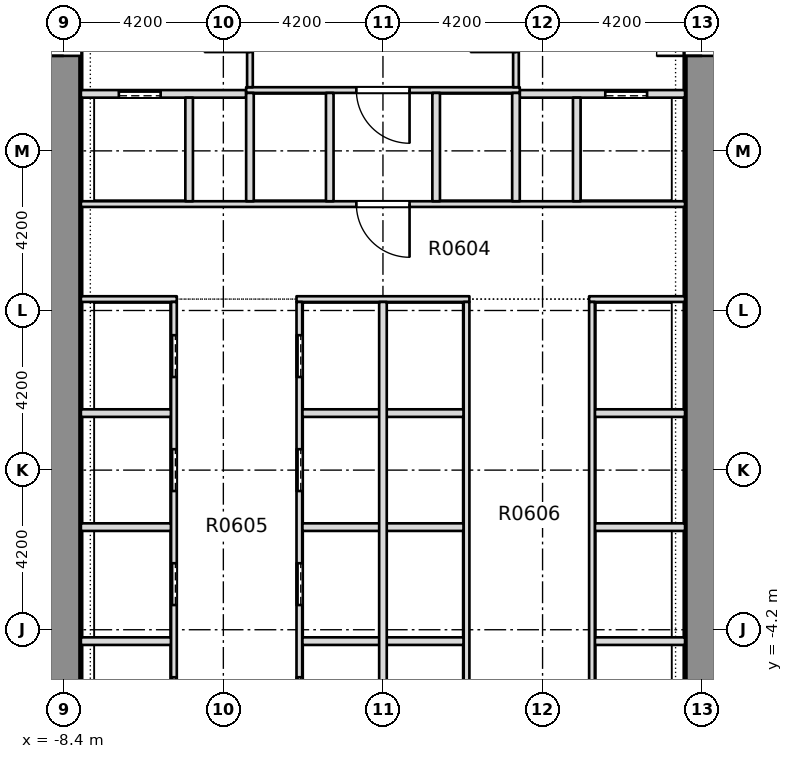
"""IFC4 building model, lengths in metres.
Left out: names, types, materials, properties, quantities, classifications, styles, units other than length and angle.
Written with IfcOpenShell. Run it as: python <this file> out.ifc"""

import sys

from ifc_helpers import new_model, si_unit, direction, frame, frame_2d, origin, place, context, subcontext, project, spatial, rectangle, extrude, element, fill, save


model = new_model("IFC4")
c1 = context("Model", 3, precision=1e-05, world=origin(), true_north=direction((0.0, 1.0)))
c2 = subcontext(c1, "Body", "Model", "MODEL_VIEW")
j1 = project(units=[si_unit("LENGTHUNIT", "METRE"), si_unit("PLANEANGLEUNIT", "RADIAN")], contexts=[c1])
p1 = place(None, origin())
s1 = spatial("IfcSite", under=j1, at=p1, CompositionType="ELEMENT")
p2 = place(p1, origin())
s2 = spatial("IfcBuilding", under=s1, at=p2, CompositionType="ELEMENT")
p3 = place(p2, frame((0.0, 0.0, 34.5)))
s3 = spatial("IfcBuildingStorey", under=s2, at=p3, CompositionType="ELEMENT", Elevation=34.5)
p4 = place(p3, frame((-8.4, -7.5, -0.32), z_axis=(0.0, 0.0, 1.0), x_axis=(0.0, 1.0, 0.0)))
e1 = element("IfcWall", 1, at=p4, inside=s3, PredefinedType="SHEAR", context=c2, shape_type="SweptSolid", body=[
    extrude(rectangle(XDim=28.35, YDim=0.9, at=frame_2d((14.175, 0.0))), origin(), (0.0, 0.0, 1.0), 3.45),
])
p5 = place(p4, frame((18.4, 0.0, 0.32)))
e2 = element("IfcOpeningElement", 2, at=p5, cuts=e1, PredefinedType="OPENING", context=c2, shape_type="SweptSolid", body=[
    extrude(rectangle(XDim=1.2, YDim=2.1, at=frame_2d((0.6, 1.05))), frame((0.0, 0.46, 0.0), z_axis=(0.0, -1.0, 0.0), x_axis=(1.0, 0.0, 0.0)), (0.0, 0.0, 1.0), 0.92),
])
p6 = place(p3, frame((8.4, -7.5, -0.32), z_axis=(0.0, 0.0, 1.0), x_axis=(0.0, 1.0, 0.0)))
e3 = element("IfcWall", 3, at=p6, inside=s3, PredefinedType="SHEAR", context=c2, shape_type="SweptSolid", body=[
    extrude(rectangle(XDim=28.35, YDim=0.9, at=frame_2d((14.175, 0.0))), origin(), (0.0, 0.0, 1.0), 3.45),
])
p7 = place(p6, frame((18.4, 0.0, 0.32)))
e4 = element("IfcOpeningElement", 4, at=p7, cuts=e3, PredefinedType="OPENING", context=c2, shape_type="SweptSolid", body=[
    extrude(rectangle(XDim=1.2, YDim=2.1, at=frame_2d((0.6, 1.05))), frame((0.0, 0.46, 0.0), z_axis=(0.0, -1.0, 0.0), x_axis=(1.0, 0.0, 0.0)), (0.0, 0.0, 1.0), 0.92),
])
p8 = place(p3, frame((-7.949, -4.5, 0.0), z_axis=(0.0, 0.0, 1.0), x_axis=(1.0, 0.0, 0.0)))
e5 = element("IfcWall", 5, at=p8, inside=s3, PredefinedType="PARTITIONING", context=c2, shape_type="SweptSolid", body=[
    extrude(rectangle(XDim=2.374, YDim=0.2, at=frame_2d((1.187, 0.0))), origin(), (0.0, 0.0, 1.0), 3.13),
])
p9 = place(p3, frame((-2.125, -4.5, 0.0), z_axis=(0.0, 0.0, 1.0), x_axis=(1.0, 0.0, 0.0)))
e6 = element("IfcWall", 6, at=p9, inside=s3, PredefinedType="PARTITIONING", context=c2, shape_type="SweptSolid", body=[
    extrude(rectangle(XDim=4.25, YDim=0.2, at=frame_2d((2.125, 0.0))), origin(), (0.0, 0.0, 1.0), 3.13),
])
for number, where, z_axis, x_axis in (
    (7, (5.575, -4.5, 0.0), (0.0, 0.0, 1.0), (1.0, 0.0, 0.0)),
    (8, (-7.949, -1.5, 0.0), (0.0, 0.0, 1.0), (1.0, 0.0, 0.0)),
):
    element("IfcWall", number, at=place(p3, frame(where, z_axis=z_axis, x_axis=x_axis)), inside=s3, PredefinedType="PARTITIONING", context=c2, shape_type="SweptSolid", body=[
        extrude(rectangle(XDim=2.374, YDim=0.2, at=frame_2d((1.187, 0.0))), origin(), (0.0, 0.0, 1.0), 3.13),
    ])
p10 = place(p3, frame((-2.125, -1.5, 0.0), z_axis=(0.0, 0.0, 1.0), x_axis=(1.0, 0.0, 0.0)))
e9 = element("IfcWall", 9, at=p10, inside=s3, PredefinedType="PARTITIONING", context=c2, shape_type="SweptSolid", body=[
    extrude(rectangle(XDim=4.25, YDim=0.2, at=frame_2d((2.125, 0.0))), origin(), (0.0, 0.0, 1.0), 3.13),
])
for number, where, z_axis, x_axis in (
    (10, (5.575, -1.5, 0.0), (0.0, 0.0, 1.0), (1.0, 0.0, 0.0)),
    (11, (-7.949, 1.5, 0.0), (0.0, 0.0, 1.0), (1.0, 0.0, 0.0)),
):
    element("IfcWall", number, at=place(p3, frame(where, z_axis=z_axis, x_axis=x_axis)), inside=s3, PredefinedType="PARTITIONING", context=c2, shape_type="SweptSolid", body=[
        extrude(rectangle(XDim=2.374, YDim=0.2, at=frame_2d((1.187, 0.0))), origin(), (0.0, 0.0, 1.0), 3.13),
    ])
p11 = place(p3, frame((-2.125, 1.5, 0.0), z_axis=(0.0, 0.0, 1.0), x_axis=(1.0, 0.0, 0.0)))
e12 = element("IfcWall", 12, at=p11, inside=s3, PredefinedType="PARTITIONING", context=c2, shape_type="SweptSolid", body=[
    extrude(rectangle(XDim=4.25, YDim=0.2, at=frame_2d((2.125, 0.0))), origin(), (0.0, 0.0, 1.0), 3.13),
])
p12 = place(p3, frame((5.575, 1.5, 0.0), z_axis=(0.0, 0.0, 1.0), x_axis=(1.0, 0.0, 0.0)))
e13 = element("IfcWall", 13, at=p12, inside=s3, PredefinedType="PARTITIONING", context=c2, shape_type="SweptSolid", body=[
    extrude(rectangle(XDim=2.374, YDim=0.2, at=frame_2d((1.187, 0.0))), origin(), (0.0, 0.0, 1.0), 3.13),
])
p13 = place(p3, frame((-7.949, 4.5, 0.0), z_axis=(0.0, 0.0, 1.0), x_axis=(1.0, 0.0, 0.0)))
e14 = element("IfcWall", 14, at=p13, inside=s3, PredefinedType="PARTITIONING", context=c2, shape_type="SweptSolid", body=[
    extrude(rectangle(XDim=2.524, YDim=0.15, at=frame_2d((1.262, 0.0))), origin(), (0.0, 0.0, 1.0), 3.13),
])
p14 = place(p3, frame((-2.275, 4.5, 0.0), z_axis=(0.0, 0.0, 1.0), x_axis=(1.0, 0.0, 0.0)))
e15 = element("IfcWall", 15, at=p14, inside=s3, PredefinedType="PARTITIONING", context=c2, shape_type="SweptSolid", body=[
    extrude(rectangle(XDim=4.55, YDim=0.15, at=frame_2d((2.275, 0.0))), origin(), (0.0, 0.0, 1.0), 3.13),
])
p15 = place(p3, frame((5.425, 4.5, 0.0), z_axis=(0.0, 0.0, 1.0), x_axis=(1.0, 0.0, 0.0)))
e16 = element("IfcWall", 16, at=p15, inside=s3, PredefinedType="PARTITIONING", context=c2, shape_type="SweptSolid", body=[
    extrude(rectangle(XDim=2.524, YDim=0.15, at=frame_2d((1.262, 0.0))), origin(), (0.0, 0.0, 1.0), 3.13),
])
p16 = place(p3, frame((-7.949, 7.0, 0.0), z_axis=(0.0, 0.0, 1.0), x_axis=(1.0, 0.0, 0.0)))
e17 = element("IfcWall", 17, at=p16, inside=s3, PredefinedType="PARTITIONING", context=c2, shape_type="SweptSolid", body=[
    extrude(rectangle(XDim=15.898, YDim=0.15, at=frame_2d((7.949, 0.0))), origin(), (0.0, 0.0, 1.0), 3.13),
])
p17 = place(p16, frame((7.249, 0.0, 0.0)))
e18 = element("IfcOpeningElement", 18, at=p17, cuts=e17, PredefinedType="OPENING", context=c2, shape_type="SweptSolid", body=[
    extrude(rectangle(XDim=1.4, YDim=2.1, at=frame_2d((0.7, 1.05))), frame((0.0, 0.085, 0.0), z_axis=(0.0, -1.0, 0.0), x_axis=(1.0, 0.0, 0.0)), (0.0, 0.0, 1.0), 0.17),
])
p18 = place(p3, frame((-7.949, 9.9, 0.0), z_axis=(0.0, 0.0, 1.0), x_axis=(1.0, 0.0, 0.0)))
e19 = element("IfcWall", 19, at=p18, inside=s3, PredefinedType="PARTITIONING", context=c2, shape_type="SweptSolid", body=[
    extrude(rectangle(XDim=4.349, YDim=0.2, at=frame_2d((2.174, 0.0))), origin(), (0.0, 0.0, 1.0), 3.13),
])
p19 = place(p18, frame((0.999, 0.0, 0.0)))
e20 = element("IfcOpeningElement", 20, at=p19, cuts=e19, PredefinedType="OPENING", context=c2, shape_type="SweptSolid", body=[
    extrude(rectangle(XDim=1.1, YDim=2.1, at=frame_2d((0.55, 1.05))), frame((0.0, 0.11, 0.0), z_axis=(0.0, -1.0, 0.0), x_axis=(1.0, 0.0, 0.0)), (0.0, 0.0, 1.0), 0.22),
])
p20 = place(p3, frame((3.6, 9.9, 0.0), z_axis=(0.0, 0.0, 1.0), x_axis=(1.0, 0.0, 0.0)))
e21 = element("IfcWall", 21, at=p20, inside=s3, PredefinedType="PARTITIONING", context=c2, shape_type="SweptSolid", body=[
    extrude(rectangle(XDim=4.349, YDim=0.2, at=frame_2d((2.174, 0.0))), origin(), (0.0, 0.0, 1.0), 3.13),
])
p21 = place(p20, frame((2.25, 0.0, 0.0)))
e22 = element("IfcOpeningElement", 22, at=p21, cuts=e21, PredefinedType="OPENING", context=c2, shape_type="SweptSolid", body=[
    extrude(rectangle(XDim=1.1, YDim=2.1, at=frame_2d((0.55, 1.05))), frame((0.0, 0.11, 0.0), z_axis=(0.0, -1.0, 0.0), x_axis=(1.0, 0.0, 0.0)), (0.0, 0.0, 1.0), 0.22),
])
p22 = place(p3, frame((-3.6, 10.0, 0.0), z_axis=(0.0, 0.0, 1.0), x_axis=(1.0, 0.0, 0.0)))
e23 = element("IfcWall", 23, at=p22, inside=s3, PredefinedType="PARTITIONING", context=c2, shape_type="SweptSolid", body=[
    extrude(rectangle(XDim=7.2, YDim=0.15, at=frame_2d((3.6, 0.0))), origin(), (0.0, 0.0, 1.0), 3.13),
])
p23 = place(p22, frame((2.9, 0.0, 0.0)))
e24 = element("IfcOpeningElement", 24, at=p23, cuts=e23, PredefinedType="OPENING", context=c2, shape_type="SweptSolid", body=[
    extrude(rectangle(XDim=1.4, YDim=2.1, at=frame_2d((0.7, 1.05))), frame((0.0, 0.085, 0.0), z_axis=(0.0, -1.0, 0.0), x_axis=(1.0, 0.0, 0.0)), (0.0, 0.0, 1.0), 0.17),
])
p24 = place(p3, frame((-5.5, -7.499, 0.0), z_axis=(0.0, 0.0, 1.0), x_axis=(0.0, 1.0, 0.0)))
e25 = element("IfcWall", 25, at=p24, inside=s3, PredefinedType="PARTITIONING", context=c2, shape_type="SweptSolid", body=[
    extrude(rectangle(XDim=11.924, YDim=0.15, at=frame_2d((5.962, 0.0))), origin(), (0.0, 0.0, 1.0), 3.13),
])
p25 = place(p24, frame((0.949, 0.0, 0.0)))
e26 = element("IfcOpeningElement", 26, at=p25, cuts=e25, PredefinedType="OPENING", context=c2, shape_type="SweptSolid", body=[
    extrude(rectangle(XDim=1.1, YDim=2.1, at=frame_2d((0.55, 1.05))), frame((0.0, 0.085, 0.0), z_axis=(0.0, -1.0, 0.0), x_axis=(1.0, 0.0, 0.0)), (0.0, 0.0, 1.0), 0.17),
])
p26 = place(p24, frame((3.949, 0.0, 0.0)))
e27 = element("IfcOpeningElement", 27, at=p26, cuts=e25, PredefinedType="OPENING", context=c2, shape_type="SweptSolid", body=[
    extrude(rectangle(XDim=1.1, YDim=2.1, at=frame_2d((0.55, 1.05))), frame((0.0, 0.085, 0.0), z_axis=(0.0, -1.0, 0.0), x_axis=(1.0, 0.0, 0.0)), (0.0, 0.0, 1.0), 0.17),
])
p27 = place(p24, frame((6.949, 0.0, 0.0)))
e28 = element("IfcOpeningElement", 28, at=p27, cuts=e25, PredefinedType="OPENING", context=c2, shape_type="SweptSolid", body=[
    extrude(rectangle(XDim=1.1, YDim=2.1, at=frame_2d((0.55, 1.05))), frame((0.0, 0.085, 0.0), z_axis=(0.0, -1.0, 0.0), x_axis=(1.0, 0.0, 0.0)), (0.0, 0.0, 1.0), 0.17),
])
p28 = place(p24, frame((9.949, 0.0, 0.0)))
e29 = element("IfcOpeningElement", 29, at=p28, cuts=e25, PredefinedType="OPENING", context=c2, shape_type="SweptSolid", body=[
    extrude(rectangle(XDim=1.1, YDim=2.1, at=frame_2d((0.55, 1.05))), frame((0.0, 0.085, 0.0), z_axis=(0.0, -1.0, 0.0), x_axis=(1.0, 0.0, 0.0)), (0.0, 0.0, 1.0), 0.17),
])
p29 = place(p3, frame((-5.1, 7.075, 0.0), z_axis=(0.0, 0.0, 1.0), x_axis=(0.0, 1.0, 0.0)))
e30 = element("IfcWall", 30, at=p29, inside=s3, PredefinedType="PARTITIONING", context=c2, shape_type="SweptSolid", body=[
    extrude(rectangle(XDim=2.725, YDim=0.2, at=frame_2d((1.363, 0.0))), origin(), (0.0, 0.0, 1.0), 3.13),
])
p30 = place(p3, frame((-3.5, 7.075, 0.0), z_axis=(0.0, 0.0, 1.0), x_axis=(0.0, 1.0, 0.0)))
e31 = element("IfcWall", 31, at=p30, inside=s3, PredefinedType="PARTITIONING", context=c2, shape_type="SweptSolid", body=[
    extrude(rectangle(XDim=2.85, YDim=0.2, at=frame_2d((1.425, 0.0))), origin(), (0.0, 0.0, 1.0), 3.13),
])
p31 = place(p3, frame((-3.5, 10.075, 0.0), z_axis=(0.0, 0.0, 1.0), x_axis=(0.0, 1.0, 0.0)))
e32 = element("IfcWall", 32, at=p31, inside=s3, PredefinedType="PARTITIONING", context=c2, shape_type="SweptSolid", body=[
    extrude(rectangle(XDim=3.075, YDim=0.15, at=frame_2d((1.538, 0.0))), origin(), (0.0, 0.0, 1.0), 3.13),
])
p32 = place(p31, frame((0.925, 0.0, 0.0)))
e33 = element("IfcOpeningElement", 33, at=p32, cuts=e32, PredefinedType="OPENING", context=c2, shape_type="SweptSolid", body=[
    extrude(rectangle(XDim=1.2, YDim=2.1, at=frame_2d((0.6, 1.05))), frame((0.0, 0.085, 0.0), z_axis=(0.0, -1.0, 0.0), x_axis=(1.0, 0.0, 0.0)), (0.0, 0.0, 1.0), 0.17),
])
p33 = place(p3, frame((-2.2, -7.499, 0.0), z_axis=(0.0, 0.0, 1.0), x_axis=(0.0, 1.0, 0.0)))
e34 = element("IfcWall", 34, at=p33, inside=s3, PredefinedType="PARTITIONING", context=c2, shape_type="SweptSolid", body=[
    extrude(rectangle(XDim=11.924, YDim=0.15, at=frame_2d((5.962, 0.0))), origin(), (0.0, 0.0, 1.0), 3.13),
])
p34 = place(p33, frame((0.949, 0.0, 0.0)))
e35 = element("IfcOpeningElement", 35, at=p34, cuts=e34, PredefinedType="OPENING", context=c2, shape_type="SweptSolid", body=[
    extrude(rectangle(XDim=1.1, YDim=2.1, at=frame_2d((0.55, 1.05))), frame((0.0, 0.085, 0.0), z_axis=(0.0, -1.0, 0.0), x_axis=(1.0, 0.0, 0.0)), (0.0, 0.0, 1.0), 0.17),
])
p35 = place(p33, frame((3.949, 0.0, 0.0)))
e36 = element("IfcOpeningElement", 36, at=p35, cuts=e34, PredefinedType="OPENING", context=c2, shape_type="SweptSolid", body=[
    extrude(rectangle(XDim=1.1, YDim=2.1, at=frame_2d((0.55, 1.05))), frame((0.0, 0.085, 0.0), z_axis=(0.0, -1.0, 0.0), x_axis=(1.0, 0.0, 0.0)), (0.0, 0.0, 1.0), 0.17),
])
p36 = place(p33, frame((6.949, 0.0, 0.0)))
e37 = element("IfcOpeningElement", 37, at=p36, cuts=e34, PredefinedType="OPENING", context=c2, shape_type="SweptSolid", body=[
    extrude(rectangle(XDim=1.1, YDim=2.1, at=frame_2d((0.55, 1.05))), frame((0.0, 0.085, 0.0), z_axis=(0.0, -1.0, 0.0), x_axis=(1.0, 0.0, 0.0)), (0.0, 0.0, 1.0), 0.17),
])
p37 = place(p33, frame((9.949, 0.0, 0.0)))
e38 = element("IfcOpeningElement", 38, at=p37, cuts=e34, PredefinedType="OPENING", context=c2, shape_type="SweptSolid", body=[
    extrude(rectangle(XDim=1.1, YDim=2.1, at=frame_2d((0.55, 1.05))), frame((0.0, 0.085, 0.0), z_axis=(0.0, -1.0, 0.0), x_axis=(1.0, 0.0, 0.0)), (0.0, 0.0, 1.0), 0.17),
])
p38 = place(p3, frame((-1.4, 7.075, 0.0), z_axis=(0.0, 0.0, 1.0), x_axis=(0.0, 1.0, 0.0)))
e39 = element("IfcWall", 39, at=p38, inside=s3, PredefinedType="PARTITIONING", context=c2, shape_type="SweptSolid", body=[
    extrude(rectangle(XDim=2.85, YDim=0.2, at=frame_2d((1.425, 0.0))), origin(), (0.0, 0.0, 1.0), 3.13),
])
p39 = place(p3, frame((0.0, -7.499, 0.0), z_axis=(0.0, 0.0, 1.0), x_axis=(0.0, 1.0, 0.0)))
e40 = element("IfcWall", 40, at=p39, inside=s3, PredefinedType="PARTITIONING", context=c2, shape_type="SweptSolid", body=[
    extrude(rectangle(XDim=11.924, YDim=0.2, at=frame_2d((5.962, 0.0))), origin(), (0.0, 0.0, 1.0), 3.13),
])
p40 = place(p3, frame((1.4, 7.075, 0.0), z_axis=(0.0, 0.0, 1.0), x_axis=(0.0, 1.0, 0.0)))
e41 = element("IfcWall", 41, at=p40, inside=s3, PredefinedType="PARTITIONING", context=c2, shape_type="SweptSolid", body=[
    extrude(rectangle(XDim=2.85, YDim=0.2, at=frame_2d((1.425, 0.0))), origin(), (0.0, 0.0, 1.0), 3.13),
])
p41 = place(p3, frame((2.2, -7.499, 0.0), z_axis=(0.0, 0.0, 1.0), x_axis=(0.0, 1.0, 0.0)))
e42 = element("IfcWall", 42, at=p41, inside=s3, PredefinedType="PARTITIONING", context=c2, shape_type="SweptSolid", body=[
    extrude(rectangle(XDim=11.924, YDim=0.15, at=frame_2d((5.962, 0.0))), origin(), (0.0, 0.0, 1.0), 3.13),
])
p42 = place(p3, frame((3.5, 7.075, 0.0), z_axis=(0.0, 0.0, 1.0), x_axis=(0.0, 1.0, 0.0)))
e43 = element("IfcWall", 43, at=p42, inside=s3, PredefinedType="PARTITIONING", context=c2, shape_type="SweptSolid", body=[
    extrude(rectangle(XDim=2.85, YDim=0.2, at=frame_2d((1.425, 0.0))), origin(), (0.0, 0.0, 1.0), 3.13),
])
p43 = place(p3, frame((3.5, 10.075, 0.0), z_axis=(0.0, 0.0, 1.0), x_axis=(0.0, 1.0, 0.0)))
e44 = element("IfcWall", 44, at=p43, inside=s3, PredefinedType="PARTITIONING", context=c2, shape_type="SweptSolid", body=[
    extrude(rectangle(XDim=3.075, YDim=0.15, at=frame_2d((1.538, 0.0))), origin(), (0.0, 0.0, 1.0), 3.13),
])
p44 = place(p43, frame((0.925, 0.0, 0.0)))
e45 = element("IfcOpeningElement", 45, at=p44, cuts=e44, PredefinedType="OPENING", context=c2, shape_type="SweptSolid", body=[
    extrude(rectangle(XDim=1.2, YDim=2.1, at=frame_2d((0.6, 1.05))), frame((0.0, 0.085, 0.0), z_axis=(0.0, -1.0, 0.0), x_axis=(1.0, 0.0, 0.0)), (0.0, 0.0, 1.0), 0.17),
])
p45 = place(p3, frame((5.1, 7.075, 0.0), z_axis=(0.0, 0.0, 1.0), x_axis=(0.0, 1.0, 0.0)))
e46 = element("IfcWall", 46, at=p45, inside=s3, PredefinedType="PARTITIONING", context=c2, shape_type="SweptSolid", body=[
    extrude(rectangle(XDim=2.725, YDim=0.2, at=frame_2d((1.363, 0.0))), origin(), (0.0, 0.0, 1.0), 3.13),
])
p46 = place(p3, frame((5.5, -7.499, 0.0), z_axis=(0.0, 0.0, 1.0), x_axis=(0.0, 1.0, 0.0)))
e47 = element("IfcWall", 47, at=p46, inside=s3, PredefinedType="PARTITIONING", context=c2, shape_type="SweptSolid", body=[
    extrude(rectangle(XDim=11.924, YDim=0.15, at=frame_2d((5.962, 0.0))), origin(), (0.0, 0.0, 1.0), 3.13),
])
p47 = place(p25, origin())
e48 = element("IfcDoor", 48, at=p47, inside=s3, OperationType="SLIDING_TO_RIGHT", PredefinedType="DOOR", context=c2, shape_type="SweptSolid", body=[
    extrude(rectangle(XDim=1.1, YDim=2.1, at=frame_2d((0.55, 1.05))), frame((0.0, 0.025, 0.0), z_axis=(0.0, -1.0, 0.0), x_axis=(1.0, 0.0, 0.0)), (0.0, 0.0, 1.0), 0.05),
])
fill(e26, e48)
p48 = place(p26, origin())
e49 = element("IfcDoor", 49, at=p48, inside=s3, OperationType="SLIDING_TO_RIGHT", PredefinedType="DOOR", context=c2, shape_type="SweptSolid", body=[
    extrude(rectangle(XDim=1.1, YDim=2.1, at=frame_2d((0.55, 1.05))), frame((0.0, 0.025, 0.0), z_axis=(0.0, -1.0, 0.0), x_axis=(1.0, 0.0, 0.0)), (0.0, 0.0, 1.0), 0.05),
])
fill(e27, e49)
p49 = place(p27, origin())
e50 = element("IfcDoor", 50, at=p49, inside=s3, OperationType="SLIDING_TO_RIGHT", PredefinedType="DOOR", context=c2, shape_type="SweptSolid", body=[
    extrude(rectangle(XDim=1.1, YDim=2.1, at=frame_2d((0.55, 1.05))), frame((0.0, 0.025, 0.0), z_axis=(0.0, -1.0, 0.0), x_axis=(1.0, 0.0, 0.0)), (0.0, 0.0, 1.0), 0.05),
])
fill(e28, e50)
p50 = place(p28, origin())
e51 = element("IfcDoor", 51, at=p50, inside=s3, OperationType="SLIDING_TO_RIGHT", PredefinedType="DOOR", context=c2, shape_type="SweptSolid", body=[
    extrude(rectangle(XDim=1.1, YDim=2.1, at=frame_2d((0.55, 1.05))), frame((0.0, 0.025, 0.0), z_axis=(0.0, -1.0, 0.0), x_axis=(1.0, 0.0, 0.0)), (0.0, 0.0, 1.0), 0.05),
])
fill(e29, e51)
p51 = place(p34, origin())
e52 = element("IfcDoor", 52, at=p51, inside=s3, OperationType="SLIDING_TO_RIGHT", PredefinedType="DOOR", context=c2, shape_type="SweptSolid", body=[
    extrude(rectangle(XDim=1.1, YDim=2.1, at=frame_2d((0.55, 1.05))), frame((0.0, 0.025, 0.0), z_axis=(0.0, -1.0, 0.0), x_axis=(1.0, 0.0, 0.0)), (0.0, 0.0, 1.0), 0.05),
])
fill(e35, e52)
p52 = place(p35, origin())
e53 = element("IfcDoor", 53, at=p52, inside=s3, OperationType="SLIDING_TO_RIGHT", PredefinedType="DOOR", context=c2, shape_type="SweptSolid", body=[
    extrude(rectangle(XDim=1.1, YDim=2.1, at=frame_2d((0.55, 1.05))), frame((0.0, 0.025, 0.0), z_axis=(0.0, -1.0, 0.0), x_axis=(1.0, 0.0, 0.0)), (0.0, 0.0, 1.0), 0.05),
])
fill(e36, e53)
p53 = place(p36, origin())
e54 = element("IfcDoor", 54, at=p53, inside=s3, OperationType="SLIDING_TO_RIGHT", PredefinedType="DOOR", context=c2, shape_type="SweptSolid", body=[
    extrude(rectangle(XDim=1.1, YDim=2.1, at=frame_2d((0.55, 1.05))), frame((0.0, 0.025, 0.0), z_axis=(0.0, -1.0, 0.0), x_axis=(1.0, 0.0, 0.0)), (0.0, 0.0, 1.0), 0.05),
])
fill(e37, e54)
p54 = place(p37, origin())
e55 = element("IfcDoor", 55, at=p54, inside=s3, OperationType="SLIDING_TO_RIGHT", PredefinedType="DOOR", context=c2, shape_type="SweptSolid", body=[
    extrude(rectangle(XDim=1.1, YDim=2.1, at=frame_2d((0.55, 1.05))), frame((0.0, 0.025, 0.0), z_axis=(0.0, -1.0, 0.0), x_axis=(1.0, 0.0, 0.0)), (0.0, 0.0, 1.0), 0.05),
])
fill(e38, e55)
p55 = place(p19, origin())
e56 = element("IfcDoor", 56, at=p55, inside=s3, OperationType="SLIDING_TO_RIGHT", PredefinedType="DOOR", context=c2, shape_type="SweptSolid", body=[
    extrude(rectangle(XDim=1.1, YDim=2.1, at=frame_2d((0.55, 1.05))), frame((0.0, 0.025, 0.0), z_axis=(0.0, -1.0, 0.0), x_axis=(1.0, 0.0, 0.0)), (0.0, 0.0, 1.0), 0.05),
])
fill(e20, e56)
p56 = place(p21, origin())
e57 = element("IfcDoor", 57, at=p56, inside=s3, OperationType="SLIDING_TO_LEFT", PredefinedType="DOOR", context=c2, shape_type="SweptSolid", body=[
    extrude(rectangle(XDim=1.1, YDim=2.1, at=frame_2d((0.55, 1.05))), frame((0.0, 0.025, 0.0), z_axis=(0.0, -1.0, 0.0), x_axis=(1.0, 0.0, 0.0)), (0.0, 0.0, 1.0), 0.05),
])
fill(e22, e57)
p57 = place(p17, origin())
e58 = element("IfcDoor", 58, at=p57, inside=s3, OperationType="SINGLE_SWING_RIGHT", PredefinedType="DOOR", context=c2, shape_type="SweptSolid", body=[
    extrude(rectangle(XDim=1.4, YDim=2.1, at=frame_2d((0.7, 1.05))), frame((0.0, 0.025, 0.0), z_axis=(0.0, -1.0, 0.0), x_axis=(1.0, 0.0, 0.0)), (0.0, 0.0, 1.0), 0.05),
])
fill(e18, e58)
p58 = place(p23, origin())
e59 = element("IfcDoor", 59, at=p58, inside=s3, OperationType="SINGLE_SWING_RIGHT", PredefinedType="DOOR", context=c2, shape_type="SweptSolid", body=[
    extrude(rectangle(XDim=1.4, YDim=2.1, at=frame_2d((0.7, 1.05))), frame((0.0, 0.025, 0.0), z_axis=(0.0, -1.0, 0.0), x_axis=(1.0, 0.0, 0.0)), (0.0, 0.0, 1.0), 0.05),
])
fill(e24, e59)
p59 = place(p5, origin())
e60 = element("IfcDoor", 60, at=p59, inside=s3, OperationType="SINGLE_SWING_LEFT", PredefinedType="DOOR", context=c2, shape_type="SweptSolid", body=[
    extrude(rectangle(XDim=1.2, YDim=2.1, at=frame_2d((0.6, 1.05))), frame((0.0, 0.025, 0.0), z_axis=(0.0, -1.0, 0.0), x_axis=(1.0, 0.0, 0.0)), (0.0, 0.0, 1.0), 0.05),
])
fill(e2, e60)
p60 = place(p7, origin())
e61 = element("IfcDoor", 61, at=p60, inside=s3, OperationType="SINGLE_SWING_LEFT", PredefinedType="DOOR", context=c2, shape_type="SweptSolid", body=[
    extrude(rectangle(XDim=1.2, YDim=2.1, at=frame_2d((0.6, 1.05))), frame((0.0, 0.025, 0.0), z_axis=(0.0, -1.0, 0.0), x_axis=(1.0, 0.0, 0.0)), (0.0, 0.0, 1.0), 0.05),
])
fill(e4, e61)
save(model, sys.argv[1])
